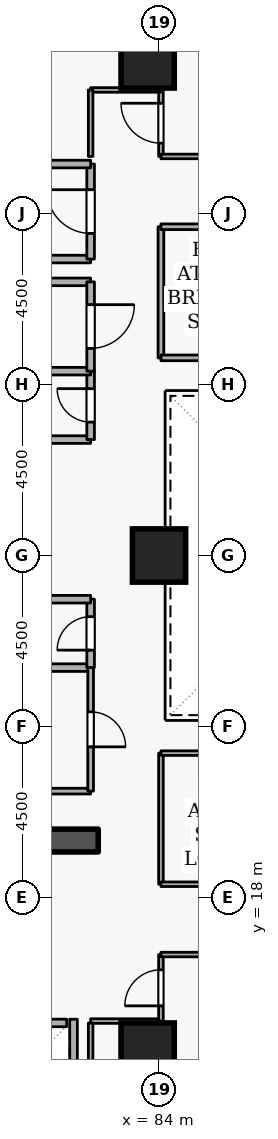
"""IFC4 building model, lengths in metres.
Left out: names, types, materials, properties, quantities, classifications, styles, units other than length and angle.
Written with IfcOpenShell. Run it as: python <this file> out.ifc"""

import sys

from ifc_helpers import new_model, si_unit, direction, frame, frame_2d, origin, origin_2d, place, context, subcontext, project, spatial, rectangle, extrude, element, fill, save


model = new_model("IFC4")
c1 = context("Model", 3, precision=1e-05, world=origin(), true_north=direction((0.0, 1.0)))
c2 = subcontext(c1, "Body", "Model", "MODEL_VIEW")
j1 = project(units=[si_unit("LENGTHUNIT", "METRE"), si_unit("PLANEANGLEUNIT", "RADIAN")], contexts=[c1])
p1 = place(None, origin())
s1 = spatial("IfcSite", under=j1, at=p1, CompositionType="ELEMENT")
p2 = place(p1, origin())
s2 = spatial("IfcBuilding", under=s1, at=p2, CompositionType="ELEMENT")
p3 = place(p2, frame((0.0, 0.0, 64.5)))
s3 = spatial("IfcBuildingStorey", under=s2, at=p3, CompositionType="ELEMENT", Elevation=64.5)
p4 = place(p3, frame((76.7, 19.5, 0.0), z_axis=(0.0, 0.0, 1.0), x_axis=(1.0, 0.0, 0.0)))
e1 = element("IfcWall", 1, at=p4, inside=s3, PredefinedType="SHEAR", context=c2, shape_type="SweptSolid", body=[
    extrude(rectangle(XDim=5.7, YDim=0.6, at=frame_2d((2.85, 0.0))), origin(), (0.0, 0.0, 1.0), 3.6),
])
for number, where, z_axis, x_axis in (
    (2, (83.7, 14.0, 0.0), (0.0, 0.0, 1.0), (1.0, 0.0, 0.0)),
    (3, (83.7, 40.0, 0.0), (0.0, 0.0, 1.0), (1.0, 0.0, 0.0)),
    (4, (84.0, 27.0, 0.0), (0.0, 0.0, 1.0), (1.0, 0.0, 0.0)),
):
    element("IfcColumn", number, at=place(p3, frame(where, z_axis=z_axis, x_axis=x_axis)), inside=s3, PredefinedType="COLUMN", context=c2, shape_type="SweptSolid", body=[
        extrude(rectangle(XDim=1.4, YDim=1.4, at=origin_2d()), origin(), (0.0, 0.0, 1.0), 3.6),
    ])
p5 = place(p3, frame((79.63, 14.7, 0.0), z_axis=(0.0, 0.0, 1.0), x_axis=(1.0, 0.0, 0.0)))
e5 = element("IfcWall", 5, at=p5, inside=s3, PredefinedType="STANDARD", context=c2, shape_type="SweptSolid", body=[
    extrude(rectangle(XDim=1.94, YDim=0.2, at=frame_2d((0.97, 0.0))), origin(), (0.0, 0.0, 1.0), 3.34),
])
p6 = place(p3, frame((81.75, 12.612, 0.0), z_axis=(0.0, 0.0, 1.0), x_axis=(0.0, 1.0, 0.0)))
e6 = element("IfcWall", 6, at=p6, inside=s3, PredefinedType="STANDARD", context=c2, shape_type="SweptSolid", body=[
    extrude(rectangle(XDim=2.186, YDim=0.2, at=frame_2d((1.093, 0.0))), origin(), (0.0, 0.0, 1.0), 3.34),
])
p7 = place(p3, frame((79.9, 34.8, 0.0), z_axis=(0.0, 0.0, 1.0), x_axis=(1.0, 0.0, 0.0)))
e7 = element("IfcWall", 7, at=p7, inside=s3, PredefinedType="STANDARD", context=c2, shape_type="SweptSolid", body=[
    extrude(rectangle(XDim=2.3, YDim=0.2, at=frame_2d((1.15, 0.0))), origin(), (0.0, 0.0, 1.0), 2.545),
])
p8 = place(p3, frame((82.2, 34.8, 0.0), z_axis=(0.0, 0.0, 1.0), x_axis=(0.0, 1.0, 0.0)))
e8 = element("IfcWall", 8, at=p8, inside=s3, PredefinedType="STANDARD", context=c2, shape_type="SweptSolid", body=[
    extrude(rectangle(XDim=2.5, YDim=0.2, at=frame_2d((1.25, 0.0))), origin(), (0.0, 0.0, 1.0), 3.34),
])
p9 = place(p8, frame((0.675, 0.0, 0.0)))
e9 = element("IfcOpeningElement", 9, at=p9, cuts=e8, PredefinedType="OPENING", context=c2, shape_type="SweptSolid", body=[
    extrude(rectangle(XDim=1.15, YDim=2.1, at=frame_2d((0.575, 1.05))), frame((0.0, 0.11, 0.0), z_axis=(0.0, -1.0, 0.0), x_axis=(1.0, 0.0, 0.0)), (0.0, 0.0, 1.0), 0.22),
])
p10 = place(p3, frame((82.2, 37.3, 0.0), z_axis=(0.0, 0.0, 1.0), x_axis=(-1.0, 0.0, 0.0)))
e10 = element("IfcWall", 10, at=p10, inside=s3, PredefinedType="STANDARD", context=c2, shape_type="SweptSolid", body=[
    extrude(rectangle(XDim=5.7, YDim=0.2, at=frame_2d((2.85, 0.0))), origin(), (0.0, 0.0, 1.0), 3.34),
])
p11 = place(p3, frame((80.15, 24.05, 0.0), z_axis=(0.0, 0.0, 1.0), x_axis=(1.0, 0.0, 0.0)))
e11 = element("IfcWall", 11, at=p11, inside=s3, PredefinedType="STANDARD", context=c2, shape_type="SweptSolid", body=[
    extrude(rectangle(XDim=2.05, YDim=0.2, at=frame_2d((1.025, 0.0))), origin(), (0.0, 0.0, 1.0), 3.34),
])
p12 = place(p3, frame((82.2, 24.05, 0.0), z_axis=(0.0, 0.0, 1.0), x_axis=(0.0, 1.0, 0.0)))
e12 = element("IfcWall", 12, at=p12, inside=s3, PredefinedType="STANDARD", context=c2, shape_type="SweptSolid", body=[
    extrude(rectangle(XDim=1.8, YDim=0.2, at=frame_2d((0.9, 0.0))), origin(), (0.0, 0.0, 1.0), 3.34),
])
p13 = place(p12, frame((0.46, 0.0, 0.0)))
e13 = element("IfcOpeningElement", 13, at=p13, cuts=e12, PredefinedType="OPENING", context=c2, shape_type="SweptSolid", body=[
    extrude(rectangle(XDim=0.88, YDim=2.04, at=frame_2d((0.44, 1.02))), frame((0.0, 0.11, 0.0), z_axis=(0.0, -1.0, 0.0), x_axis=(1.0, 0.0, 0.0)), (0.0, 0.0, 1.0), 0.22),
])
for number, where, z_axis, x_axis in (
    (14, (82.2, 25.85, 0.0), (0.0, 0.0, 1.0), (-1.0, 0.0, 0.0)),
    (15, (80.15, 30.05, 0.0), (0.0, 0.0, 1.0), (1.0, 0.0, 0.0)),
):
    element("IfcWall", number, at=place(p3, frame(where, z_axis=z_axis, x_axis=x_axis)), inside=s3, PredefinedType="STANDARD", context=c2, shape_type="SweptSolid", body=[
        extrude(rectangle(XDim=2.05, YDim=0.2, at=frame_2d((1.025, 0.0))), origin(), (0.0, 0.0, 1.0), 3.34),
    ])
p14 = place(p3, frame((82.2, 30.05, 0.0), z_axis=(0.0, 0.0, 1.0), x_axis=(0.0, 1.0, 0.0)))
e16 = element("IfcWall", 16, at=p14, inside=s3, PredefinedType="STANDARD", context=c2, shape_type="SweptSolid", body=[
    extrude(rectangle(XDim=1.8, YDim=0.2, at=frame_2d((0.9, 0.0))), origin(), (0.0, 0.0, 1.0), 3.34),
])
p15 = place(p14, frame((0.46, 0.0, 0.0)))
e17 = element("IfcOpeningElement", 17, at=p15, cuts=e16, PredefinedType="OPENING", context=c2, shape_type="SweptSolid", body=[
    extrude(rectangle(XDim=0.88, YDim=2.04, at=frame_2d((0.44, 1.02))), frame((0.0, 0.11, 0.0), z_axis=(0.0, -1.0, 0.0), x_axis=(1.0, 0.0, 0.0)), (0.0, 0.0, 1.0), 0.22),
])
p16 = place(p3, frame((82.2, 31.85, 0.0), z_axis=(0.0, 0.0, 1.0), x_axis=(-1.0, 0.0, 0.0)))
e18 = element("IfcWall", 18, at=p16, inside=s3, PredefinedType="STANDARD", context=c2, shape_type="SweptSolid", body=[
    extrude(rectangle(XDim=2.05, YDim=0.2, at=frame_2d((1.025, 0.0))), origin(), (0.0, 0.0, 1.0), 3.34),
])
p17 = place(p3, frame((80.15, 34.2, 0.0), z_axis=(0.0, 0.0, 1.0), x_axis=(1.0, 0.0, 0.0)))
e19 = element("IfcWall", 19, at=p17, inside=s3, PredefinedType="STANDARD", context=c2, shape_type="SweptSolid", body=[
    extrude(rectangle(XDim=2.05, YDim=0.2, at=frame_2d((1.025, 0.0))), origin(), (0.0, 0.0, 1.0), 2.545),
])
p18 = place(p3, frame((82.2, 34.2, 0.0), z_axis=(0.0, 0.0, 1.0), x_axis=(0.0, -1.0, 0.0)))
e20 = element("IfcWall", 20, at=p18, inside=s3, PredefinedType="STANDARD", context=c2, shape_type="SweptSolid", body=[
    extrude(rectangle(XDim=2.35, YDim=0.2, at=frame_2d((1.175, 0.0))), origin(), (0.0, 0.0, 1.0), 3.34),
])
p19 = place(p18, frame((0.6, 0.0, 0.0)))
e21 = element("IfcOpeningElement", 21, at=p19, cuts=e20, PredefinedType="OPENING", context=c2, shape_type="SweptSolid", body=[
    extrude(rectangle(XDim=1.15, YDim=2.1, at=frame_2d((0.575, 1.05))), frame((0.0, 0.11, 0.0), z_axis=(0.0, -1.0, 0.0), x_axis=(1.0, 0.0, 0.0)), (0.0, 0.0, 1.0), 0.22),
])
p20 = place(p3, frame((82.2, 20.8, 0.0), z_axis=(0.0, 0.0, 1.0), x_axis=(-1.0, 0.0, 0.0)))
e22 = element("IfcWall", 22, at=p20, inside=s3, PredefinedType="PARTITIONING", context=c2, shape_type="SweptSolid", body=[
    extrude(rectangle(XDim=2.05, YDim=0.15, at=frame_2d((1.025, 0.0))), origin(), (0.0, 0.0, 1.0), 3.34),
])
p21 = place(p3, frame((82.2, 24.05, 0.0), z_axis=(0.0, 0.0, 1.0), x_axis=(0.0, -1.0, 0.0)))
e23 = element("IfcWall", 23, at=p21, inside=s3, PredefinedType="PARTITIONING", context=c2, shape_type="SweptSolid", body=[
    extrude(rectangle(XDim=3.25, YDim=0.15, at=frame_2d((1.625, 0.0))), origin(), (0.0, 0.0, 1.0), 3.34),
])
p22 = place(p21, frame((1.165, 0.0, 0.0)))
e24 = element("IfcOpeningElement", 24, at=p22, cuts=e23, PredefinedType="OPENING", context=c2, shape_type="SweptSolid", body=[
    extrude(rectangle(XDim=0.92, YDim=2.08, at=frame_2d((0.46, 1.04))), frame((0.0, 0.085, 0.0), z_axis=(0.0, -1.0, 0.0), x_axis=(1.0, 0.0, 0.0)), (0.0, 0.0, 1.0), 0.17),
])
p23 = place(p3, frame((82.2, 14.75, 0.0), z_axis=(0.0, 0.0, 1.0), x_axis=(1.0, 0.0, 0.0)))
e25 = element("IfcWall", 25, at=p23, inside=s3, PredefinedType="PARTITIONING", context=c2, shape_type="SweptSolid", body=[
    extrude(rectangle(XDim=1.85, YDim=0.12, at=frame_2d((0.925, 0.0))), origin(), (0.0, 0.0, 1.0), 3.34),
])
p24 = place(p3, frame((84.05, 14.75, 0.0), z_axis=(0.0, 0.0, 1.0), x_axis=(0.0, 1.0, 0.0)))
e26 = element("IfcWall", 26, at=p24, inside=s3, PredefinedType="PARTITIONING", context=c2, shape_type="SweptSolid", body=[
    extrude(rectangle(XDim=1.75, YDim=0.12, at=frame_2d((0.875, 0.0))), origin(), (0.0, 0.0, 1.0), 3.34),
])
p25 = place(p24, frame((0.4, 0.0, 0.0)))
e27 = element("IfcOpeningElement", 27, at=p25, cuts=e26, PredefinedType="OPENING", context=c2, shape_type="SweptSolid", body=[
    extrude(rectangle(XDim=0.95, YDim=2.1, at=frame_2d((0.475, 1.05))), frame((0.0, 0.07, 0.0), z_axis=(0.0, -1.0, 0.0), x_axis=(1.0, 0.0, 0.0)), (0.0, 0.0, 1.0), 0.14),
])
p26 = place(p3, frame((84.05, 16.5, 0.0), z_axis=(0.0, 0.0, 1.0), x_axis=(1.0, 0.0, 0.0)))
e28 = element("IfcWall", 28, at=p26, inside=s3, PredefinedType="PARTITIONING", context=c2, shape_type="SweptSolid", body=[
    extrude(rectangle(XDim=1.3, YDim=0.12, at=frame_2d((0.65, 0.0))), origin(), (0.0, 0.0, 1.0), 3.34),
])
p27 = place(p3, frame((82.2, 12.4, 0.0), z_axis=(0.0, 0.0, 1.0), x_axis=(0.0, 1.0, 0.0)))
e29 = element("IfcWall", 29, at=p27, inside=s3, PredefinedType="PARTITIONING", context=c2, shape_type="SweptSolid", body=[
    extrude(rectangle(XDim=2.3, YDim=0.12, at=frame_2d((1.15, 0.0))), origin(), (0.0, 0.0, 1.0), 3.34),
])
p28 = place(p3, frame((84.05, 37.5, 0.0), z_axis=(0.0, 0.0, 1.0), x_axis=(0.0, 1.0, 0.0)))
e30 = element("IfcWall", 30, at=p28, inside=s3, PredefinedType="PARTITIONING", context=c2, shape_type="SweptSolid", body=[
    extrude(rectangle(XDim=1.75, YDim=0.12, at=frame_2d((0.875, 0.0))), origin(), (0.0, 0.0, 1.0), 3.34),
])
p29 = place(p28, frame((0.35, 0.0, 0.0)))
e31 = element("IfcOpeningElement", 31, at=p29, cuts=e30, PredefinedType="OPENING", context=c2, shape_type="SweptSolid", body=[
    extrude(rectangle(XDim=1.05, YDim=2.1, at=frame_2d((0.525, 1.05))), frame((0.0, 0.07, 0.0), z_axis=(0.0, -1.0, 0.0), x_axis=(1.0, 0.0, 0.0)), (0.0, 0.0, 1.0), 0.14),
])
p30 = place(p3, frame((84.05, 39.25, 0.0), z_axis=(0.0, 0.0, 1.0), x_axis=(-1.0, 0.0, 0.0)))
e32 = element("IfcWall", 32, at=p30, inside=s3, PredefinedType="PARTITIONING", context=c2, shape_type="SweptSolid", body=[
    extrude(rectangle(XDim=1.85, YDim=0.12, at=frame_2d((0.925, 0.0))), origin(), (0.0, 0.0, 1.0), 3.34),
])
p31 = place(p3, frame((82.2, 39.25, 0.0), z_axis=(0.0, 0.0, 1.0), x_axis=(0.0, -1.0, 0.0)))
e33 = element("IfcWall", 33, at=p31, inside=s3, PredefinedType="PARTITIONING", context=c2, shape_type="SweptSolid", body=[
    extrude(rectangle(XDim=1.75, YDim=0.12, at=frame_2d((0.875, 0.0))), origin(), (0.0, 0.0, 1.0), 3.34),
])
p32 = place(p3, frame((85.35, 37.5, 0.0), z_axis=(0.0, 0.0, 1.0), x_axis=(-1.0, 0.0, 0.0)))
e34 = element("IfcWall", 34, at=p32, inside=s3, PredefinedType="PARTITIONING", context=c2, shape_type="SweptSolid", body=[
    extrude(rectangle(XDim=1.3, YDim=0.12, at=frame_2d((0.65, 0.0))), origin(), (0.0, 0.0, 1.0), 3.34),
])
p33 = place(p3, frame((84.05, 32.2, 0.0), z_axis=(0.0, 0.0, 1.0), x_axis=(0.0, 1.0, 0.0)))
e35 = element("IfcWall", 35, at=p33, inside=s3, PredefinedType="PARTITIONING", context=c2, shape_type="SweptSolid", body=[
    extrude(rectangle(XDim=3.45, YDim=0.15, at=frame_2d((1.725, 0.0))), origin(), (0.0, 0.0, 1.0), 3.34),
])
p34 = place(p3, frame((84.05, 35.65, 0.0), z_axis=(0.0, 0.0, 1.0), x_axis=(1.0, 0.0, 0.0)))
e36 = element("IfcWall", 36, at=p34, inside=s3, PredefinedType="PARTITIONING", context=c2, shape_type="SweptSolid", body=[
    extrude(rectangle(XDim=8.9, YDim=0.15, at=frame_2d((4.45, 0.0))), origin(), (0.0, 0.0, 1.0), 3.34),
])
p35 = place(p34, frame((3.8, 0.0, 0.0)))
e37 = element("IfcOpeningElement", 37, at=p35, cuts=e36, PredefinedType="OPENING", context=c2, shape_type="SweptSolid", body=[
    extrude(rectangle(XDim=1.3, YDim=2.12, at=frame_2d((0.65, 1.06))), frame((0.0, 0.085, 0.0), z_axis=(0.0, -1.0, 0.0), x_axis=(1.0, 0.0, 0.0)), (0.0, 0.0, 1.0), 0.17),
])
p36 = place(p3, frame((92.95, 32.2, 0.0), z_axis=(0.0, 0.0, 1.0), x_axis=(-1.0, 0.0, 0.0)))
e38 = element("IfcWall", 38, at=p36, inside=s3, PredefinedType="PARTITIONING", context=c2, shape_type="SweptSolid", body=[
    extrude(rectangle(XDim=8.9, YDim=0.15, at=frame_2d((4.45, 0.0))), origin(), (0.0, 0.0, 1.0), 3.34),
])
p37 = place(p3, frame((84.05, 18.35, 0.0), z_axis=(0.0, 0.0, 1.0), x_axis=(0.0, 1.0, 0.0)))
e39 = element("IfcWall", 39, at=p37, inside=s3, PredefinedType="PARTITIONING", context=c2, shape_type="SweptSolid", body=[
    extrude(rectangle(XDim=3.45, YDim=0.12, at=frame_2d((1.725, 0.0))), origin(), (0.0, 0.0, 1.0), 3.34),
])
p38 = place(p3, frame((84.05, 21.8, 0.0), z_axis=(0.0, 0.0, 1.0), x_axis=(1.0, 0.0, 0.0)))
e40 = element("IfcWall", 40, at=p38, inside=s3, PredefinedType="PARTITIONING", context=c2, shape_type="SweptSolid", body=[
    extrude(rectangle(XDim=8.9, YDim=0.12, at=frame_2d((4.45, 0.0))), origin(), (0.0, 0.0, 1.0), 3.34),
])
p39 = place(p3, frame((92.95, 18.35, 0.0), z_axis=(0.0, 0.0, 1.0), x_axis=(-1.0, 0.0, 0.0)))
e41 = element("IfcWall", 41, at=p39, inside=s3, PredefinedType="PARTITIONING", context=c2, shape_type="SweptSolid", body=[
    extrude(rectangle(XDim=8.9, YDim=0.12, at=frame_2d((4.45, 0.0))), origin(), (0.0, 0.0, 1.0), 3.34),
])
p40 = place(p39, frame((3.975, 0.0, 0.0)))
e42 = element("IfcOpeningElement", 42, at=p40, cuts=e41, PredefinedType="OPENING", context=c2, shape_type="SweptSolid", body=[
    extrude(rectangle(XDim=0.95, YDim=2.1, at=frame_2d((0.475, 1.05))), frame((0.0, 0.07, 0.0), z_axis=(0.0, -1.0, 0.0), x_axis=(1.0, 0.0, 0.0)), (0.0, 0.0, 1.0), 0.14),
])
p41 = place(p9, origin())
e43 = element("IfcDoor", 43, at=p41, inside=s3, OperationType="SINGLE_SWING_RIGHT", PredefinedType="DOOR", context=c2, shape_type="SweptSolid", body=[
    extrude(rectangle(XDim=1.15, YDim=2.1, at=frame_2d((0.575, 1.05))), frame((0.0, 0.025, 0.0), z_axis=(0.0, -1.0, 0.0), x_axis=(1.0, 0.0, 0.0)), (0.0, 0.0, 1.0), 0.05),
])
fill(e9, e43)
p42 = place(p13, origin())
e44 = element("IfcDoor", 44, at=p42, inside=s3, OperationType="SINGLE_SWING_LEFT", PredefinedType="DOOR", context=c2, shape_type="SweptSolid", body=[
    extrude(rectangle(XDim=0.88, YDim=2.04, at=frame_2d((0.44, 1.02))), frame((0.0, 0.025, 0.0), z_axis=(0.0, -1.0, 0.0), x_axis=(1.0, 0.0, 0.0)), (0.0, 0.0, 1.0), 0.05),
])
fill(e13, e44)
p43 = place(p15, origin())
e45 = element("IfcDoor", 45, at=p43, inside=s3, OperationType="SINGLE_SWING_RIGHT", PredefinedType="DOOR", context=c2, shape_type="SweptSolid", body=[
    extrude(rectangle(XDim=0.88, YDim=2.04, at=frame_2d((0.44, 1.02))), frame((0.0, 0.025, 0.0), z_axis=(0.0, -1.0, 0.0), x_axis=(1.0, 0.0, 0.0)), (0.0, 0.0, 1.0), 0.05),
])
fill(e17, e45)
p44 = place(p22, origin())
e46 = element("IfcDoor", 46, at=p44, inside=s3, OperationType="SINGLE_SWING_RIGHT", PredefinedType="DOOR", context=c2, shape_type="SweptSolid", body=[
    extrude(rectangle(XDim=0.92, YDim=2.08, at=frame_2d((0.46, 1.04))), frame((0.0, 0.025, 0.0), z_axis=(0.0, -1.0, 0.0), x_axis=(1.0, 0.0, 0.0)), (0.0, 0.0, 1.0), 0.05),
])
fill(e24, e46)
p45 = place(p19, origin())
e47 = element("IfcDoor", 47, at=p45, inside=s3, OperationType="SINGLE_SWING_LEFT", PredefinedType="DOOR", context=c2, shape_type="SweptSolid", body=[
    extrude(rectangle(XDim=1.15, YDim=2.1, at=frame_2d((0.575, 1.05))), frame((0.0, 0.025, 0.0), z_axis=(0.0, -1.0, 0.0), x_axis=(1.0, 0.0, 0.0)), (0.0, 0.0, 1.0), 0.05),
])
fill(e21, e47)
p46 = place(p25, origin())
e48 = element("IfcDoor", 48, at=p46, inside=s3, OperationType="SINGLE_SWING_LEFT", PredefinedType="DOOR", context=c2, shape_type="SweptSolid", body=[
    extrude(rectangle(XDim=0.95, YDim=2.1, at=frame_2d((0.475, 1.05))), frame((0.0, 0.025, 0.0), z_axis=(0.0, -1.0, 0.0), x_axis=(1.0, 0.0, 0.0)), (0.0, 0.0, 1.0), 0.05),
])
fill(e27, e48)
p47 = place(p29, origin())
e49 = element("IfcDoor", 49, at=p47, inside=s3, OperationType="SINGLE_SWING_RIGHT", PredefinedType="DOOR", context=c2, shape_type="SweptSolid", body=[
    extrude(rectangle(XDim=1.05, YDim=2.1, at=frame_2d((0.525, 1.05))), frame((0.0, 0.025, 0.0), z_axis=(0.0, -1.0, 0.0), x_axis=(1.0, 0.0, 0.0)), (0.0, 0.0, 1.0), 0.05),
])
fill(e31, e49)
save(model, sys.argv[1])
